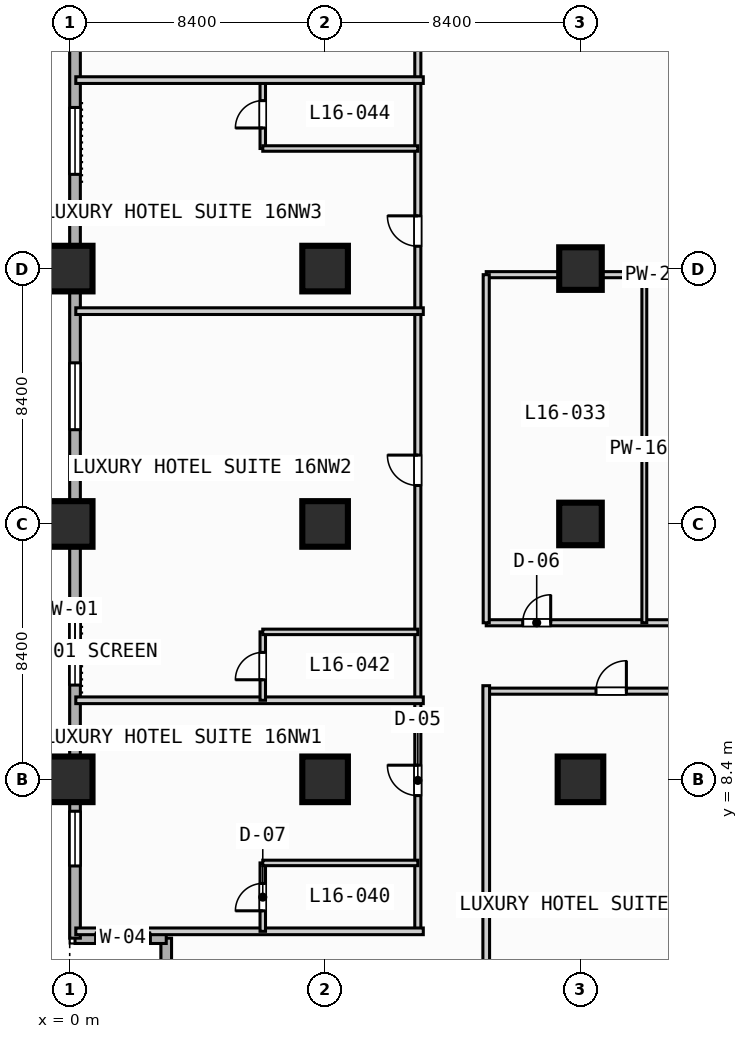
"""IFC4 building model, lengths in metres.
Left out: names, types, materials, properties, quantities, classifications, styles, units other than length and angle.
Written with IfcOpenShell. Run it as: python <this file> out.ifc"""

import sys

from ifc_helpers import new_model, si_unit, direction, frame, frame_2d, origin, origin_2d, place, context, subcontext, project, spatial, rectangle, extrude, element, fill, save


model = new_model("IFC4")
c1 = context("Model", 3, precision=1e-05, world=origin(), true_north=direction((0.0, 1.0)))
c2 = subcontext(c1, "Body", "Model", "MODEL_VIEW")
j1 = project(units=[si_unit("LENGTHUNIT", "METRE"), si_unit("PLANEANGLEUNIT", "RADIAN")], contexts=[c1])
p1 = place(None, origin())
s1 = spatial("IfcSite", under=j1, at=p1, CompositionType="ELEMENT")
p2 = place(p1, origin())
s2 = spatial("IfcBuilding", under=s1, at=p2, CompositionType="ELEMENT")
p3 = place(p2, frame((0.0, 0.0, 70.0)))
s3 = spatial("IfcBuildingStorey", under=s2, at=p3, CompositionType="ELEMENT", Elevation=70.0)
for number, where, z_axis, x_axis in (
    (1, (0.0, 8.4, 0.0), (0.0, 0.0, 1.0), (1.0, 0.0, 0.0)),
    (2, (0.0, 16.8, 0.0), (0.0, 0.0, 1.0), (1.0, 0.0, 0.0)),
    (3, (0.0, 25.2, 0.0), (0.0, 0.0, 1.0), (1.0, 0.0, 0.0)),
    (4, (8.4, 8.4, 0.0), (0.0, 0.0, 1.0), (1.0, 0.0, 0.0)),
    (5, (8.4, 16.8, 0.0), (0.0, 0.0, 1.0), (1.0, 0.0, 0.0)),
    (6, (8.4, 25.2, 0.0), (0.0, 0.0, 1.0), (1.0, 0.0, 0.0)),
    (7, (16.8, 8.4, 0.0), (0.0, 0.0, 1.0), (1.0, 0.0, 0.0)),
):
    element("IfcColumn", number, at=place(p3, frame(where, z_axis=z_axis, x_axis=x_axis)), inside=s3, PredefinedType="COLUMN", context=c2, shape_type="SweptSolid", body=[
        extrude(rectangle(XDim=1.5, YDim=1.5, at=origin_2d()), origin(), (0.0, 0.0, 1.0), 3.8),
    ])
for number, where, z_axis, x_axis in (
    (8, (16.8, 16.8, 0.0), (0.0, 0.0, 1.0), (1.0, 0.0, 0.0)),
    (9, (16.8, 25.2, 0.0), (0.0, 0.0, 1.0), (1.0, 0.0, 0.0)),
):
    element("IfcColumn", number, at=place(p3, frame(where, z_axis=z_axis, x_axis=x_axis)), inside=s3, PredefinedType="COLUMN", context=c2, shape_type="SweptSolid", body=[
        extrude(rectangle(XDim=1.4, YDim=1.4, at=origin_2d()), origin(), (0.0, 0.0, 1.0), 3.8),
    ])
p4 = place(p3, frame((3.175, 0.175, 0.0), z_axis=(0.0, 0.0, 1.0), x_axis=(0.0, 1.0, 0.0)))
e10 = element("IfcWall", 10, at=p4, inside=s3, PredefinedType="STANDARD", context=c2, shape_type="SweptSolid", body=[
    extrude(rectangle(XDim=3.0, YDim=0.35, at=frame_2d((1.5, 0.0))), origin(), (0.0, 0.0, 1.0), 3.55),
])
p5 = place(p3, frame((3.175, 3.175, 0.0), z_axis=(0.0, 0.0, 1.0), x_axis=(-1.0, 0.0, 0.0)))
e11 = element("IfcWall", 11, at=p5, inside=s3, PredefinedType="STANDARD", context=c2, shape_type="SweptSolid", body=[
    extrude(rectangle(XDim=3.0, YDim=0.35, at=frame_2d((1.5, 0.0))), origin(), (0.0, 0.0, 1.0), 3.55),
])
p6 = place(p5, frame((0.522, 0.0, 0.85)))
e12 = element("IfcOpeningElement", 12, at=p6, cuts=e11, PredefinedType="OPENING", context=c2, shape_type="SweptSolid", body=[
    extrude(rectangle(XDim=1.8, YDim=1.8, at=frame_2d((0.9, 0.9))), frame((0.0, 0.185, 0.0), z_axis=(0.0, -1.0, 0.0), x_axis=(1.0, 0.0, 0.0)), (0.0, 0.0, 1.0), 0.37),
])
p7 = place(p3, frame((0.175, 3.175, 0.0), z_axis=(0.0, 0.0, 1.0), x_axis=(0.0, 1.0, 0.0)))
e13 = element("IfcWall", 13, at=p7, inside=s3, PredefinedType="STANDARD", context=c2, shape_type="SweptSolid", body=[
    extrude(rectangle(XDim=86.05, YDim=0.35, at=frame_2d((43.025, 0.0))), origin(), (0.0, 0.0, 1.0), 3.55),
])
p8 = place(p7, frame((42.325, 0.0, 0.0)))
e14 = element("IfcOpeningElement", 14, at=p8, cuts=e13, PredefinedType="OPENING", context=c2, shape_type="SweptSolid", body=[
    extrude(rectangle(XDim=1.4, YDim=2.2, at=frame_2d((0.7, 1.1))), frame((0.0, 0.185, 0.0), z_axis=(0.0, -1.0, 0.0), x_axis=(1.0, 0.0, 0.0)), (0.0, 0.0, 1.0), 0.37),
])
p9 = place(p7, frame((8.325, 0.0, 0.85)))
e15 = element("IfcOpeningElement", 15, at=p9, cuts=e13, PredefinedType="OPENING", context=c2, shape_type="SweptSolid", body=[
    extrude(rectangle(XDim=2.2, YDim=1.8, at=frame_2d((1.1, 0.9))), frame((0.0, 0.185, 0.0), z_axis=(0.0, -1.0, 0.0), x_axis=(1.0, 0.0, 0.0)), (0.0, 0.0, 1.0), 0.37),
])
p10 = place(p7, frame((16.725, 0.0, 0.85)))
e16 = element("IfcOpeningElement", 16, at=p10, cuts=e13, PredefinedType="OPENING", context=c2, shape_type="SweptSolid", body=[
    extrude(rectangle(XDim=2.2, YDim=1.8, at=frame_2d((1.1, 0.9))), frame((0.0, 0.185, 0.0), z_axis=(0.0, -1.0, 0.0), x_axis=(1.0, 0.0, 0.0)), (0.0, 0.0, 1.0), 0.37),
])
p11 = place(p7, frame((25.125, 0.0, 0.85)))
e17 = element("IfcOpeningElement", 17, at=p11, cuts=e13, PredefinedType="OPENING", context=c2, shape_type="SweptSolid", body=[
    extrude(rectangle(XDim=2.2, YDim=1.8, at=frame_2d((1.1, 0.9))), frame((0.0, 0.185, 0.0), z_axis=(0.0, -1.0, 0.0), x_axis=(1.0, 0.0, 0.0)), (0.0, 0.0, 1.0), 0.37),
])
p12 = place(p7, frame((33.525, 0.0, 0.85)))
e18 = element("IfcOpeningElement", 18, at=p12, cuts=e13, PredefinedType="OPENING", context=c2, shape_type="SweptSolid", body=[
    extrude(rectangle(XDim=2.2, YDim=1.8, at=frame_2d((1.1, 0.9))), frame((0.0, 0.185, 0.0), z_axis=(0.0, -1.0, 0.0), x_axis=(1.0, 0.0, 0.0)), (0.0, 0.0, 1.0), 0.37),
])
p13 = place(p7, frame((2.375, 0.0, 0.85)))
e19 = element("IfcOpeningElement", 19, at=p13, cuts=e13, PredefinedType="OPENING", context=c2, shape_type="SweptSolid", body=[
    extrude(rectangle(XDim=1.8, YDim=1.8, at=frame_2d((0.9, 0.9))), frame((0.0, 0.185, 0.0), z_axis=(0.0, -1.0, 0.0), x_axis=(1.0, 0.0, 0.0)), (0.0, 0.0, 1.0), 0.37),
])
p14 = place(p7, frame((56.475, 0.0, 0.85)))
e20 = element("IfcOpeningElement", 20, at=p14, cuts=e13, PredefinedType="OPENING", context=c2, shape_type="SweptSolid", body=[
    extrude(rectangle(XDim=1.8, YDim=1.8, at=frame_2d((0.9, 0.9))), frame((0.0, 0.185, 0.0), z_axis=(0.0, -1.0, 0.0), x_axis=(1.0, 0.0, 0.0)), (0.0, 0.0, 1.0), 0.37),
])
p15 = place(p3, frame((13.7, 13.55, 0.0), z_axis=(0.0, 0.0, 1.0), x_axis=(1.0, 0.0, 0.0)))
e21 = element("IfcWall", 21, at=p15, inside=s3, PredefinedType="PARTITIONING", context=c2, shape_type="SweptSolid", body=[
    extrude(rectangle(XDim=9.9, YDim=0.2, at=frame_2d((4.95, 0.0))), origin(), (0.0, 0.0, 1.0), 3.55),
])
p16 = place(p15, frame((1.2, 0.0, 0.0)))
e22 = element("IfcOpeningElement", 22, at=p16, cuts=e21, PredefinedType="OPENING", context=c2, shape_type="SweptSolid", body=[
    extrude(rectangle(XDim=0.92, YDim=2.1, at=frame_2d((0.46, 1.05))), frame((0.0, 0.11, 0.0), z_axis=(0.0, -1.0, 0.0), x_axis=(1.0, 0.0, 0.0)), (0.0, 0.0, 1.0), 0.22),
])
p17 = place(p15, frame((6.4, 0.0, 0.0)))
e23 = element("IfcOpeningElement", 23, at=p17, cuts=e21, PredefinedType="OPENING", context=c2, shape_type="SweptSolid", body=[
    extrude(rectangle(XDim=0.92, YDim=2.1, at=frame_2d((0.46, 1.05))), frame((0.0, 0.11, 0.0), z_axis=(0.0, -1.0, 0.0), x_axis=(1.0, 0.0, 0.0)), (0.0, 0.0, 1.0), 0.22),
])
p18 = place(p3, frame((18.9, 13.55, 0.0), z_axis=(0.0, 0.0, 1.0), x_axis=(0.0, 1.0, 0.0)))
e24 = element("IfcWall", 24, at=p18, inside=s3, PredefinedType="PARTITIONING", context=c2, shape_type="SweptSolid", body=[
    extrude(rectangle(XDim=11.45, YDim=0.16, at=frame_2d((5.725, 0.0))), origin(), (0.0, 0.0, 1.0), 3.55),
])
p19 = place(p3, frame((13.7, 25.0, 0.0), z_axis=(0.0, 0.0, 1.0), x_axis=(1.0, 0.0, 0.0)))
e25 = element("IfcWall", 25, at=p19, inside=s3, PredefinedType="PARTITIONING", context=c2, shape_type="SweptSolid", body=[
    extrude(rectangle(XDim=9.9, YDim=0.2, at=frame_2d((4.95, 0.0))), origin(), (0.0, 0.0, 1.0), 2.8),
])
p20 = place(p3, frame((13.7, 13.55, 0.0), z_axis=(0.0, 0.0, 1.0), x_axis=(0.0, 1.0, 0.0)))
e26 = element("IfcWall", 26, at=p20, inside=s3, PredefinedType="PARTITIONING", context=c2, shape_type="SweptSolid", body=[
    extrude(rectangle(XDim=11.45, YDim=0.2, at=frame_2d((5.725, 0.0))), origin(), (0.0, 0.0, 1.0), 3.55),
])
p21 = place(p3, frame((11.45, 3.4, 0.0), z_axis=(0.0, 0.0, 1.0), x_axis=(0.0, 1.0, 0.0)))
e27 = element("IfcWall", 27, at=p21, inside=s3, PredefinedType="PARTITIONING", context=c2, shape_type="SweptSolid", body=[
    extrude(rectangle(XDim=60.4, YDim=0.2, at=frame_2d((30.2, 0.0))), origin(), (0.0, 0.0, 1.0), 3.55),
])
p22 = place(p21, frame((4.465, 0.0, 0.0)))
e28 = element("IfcOpeningElement", 28, at=p22, cuts=e27, PredefinedType="OPENING", context=c2, shape_type="SweptSolid", body=[
    extrude(rectangle(XDim=1.0, YDim=2.15, at=frame_2d((0.5, 1.075))), frame((0.0, 0.11, 0.0), z_axis=(0.0, -1.0, 0.0), x_axis=(1.0, 0.0, 0.0)), (0.0, 0.0, 1.0), 0.22),
])
p23 = place(p21, frame((14.665, 0.0, 0.0)))
e29 = element("IfcOpeningElement", 29, at=p23, cuts=e27, PredefinedType="OPENING", context=c2, shape_type="SweptSolid", body=[
    extrude(rectangle(XDim=1.0, YDim=2.15, at=frame_2d((0.5, 1.075))), frame((0.0, 0.11, 0.0), z_axis=(0.0, -1.0, 0.0), x_axis=(1.0, 0.0, 0.0)), (0.0, 0.0, 1.0), 0.22),
])
p24 = place(p21, frame((22.535, 0.0, 0.0)))
e30 = element("IfcOpeningElement", 30, at=p24, cuts=e27, PredefinedType="OPENING", context=c2, shape_type="SweptSolid", body=[
    extrude(rectangle(XDim=1.0, YDim=2.15, at=frame_2d((0.5, 1.075))), frame((0.0, 0.11, 0.0), z_axis=(0.0, -1.0, 0.0), x_axis=(1.0, 0.0, 0.0)), (0.0, 0.0, 1.0), 0.22),
])
p25 = place(p21, frame((31.16, 0.0, 0.0)))
e31 = element("IfcOpeningElement", 31, at=p25, cuts=e27, PredefinedType="OPENING", context=c2, shape_type="SweptSolid", body=[
    extrude(rectangle(XDim=1.0, YDim=2.15, at=frame_2d((0.5, 1.075))), frame((0.0, 0.11, 0.0), z_axis=(0.0, -1.0, 0.0), x_axis=(1.0, 0.0, 0.0)), (0.0, 0.0, 1.0), 0.22),
])
p26 = place(p21, frame((42.36, 0.0, 0.0)))
e32 = element("IfcOpeningElement", 32, at=p26, cuts=e27, PredefinedType="OPENING", context=c2, shape_type="SweptSolid", body=[
    extrude(rectangle(XDim=1.0, YDim=2.15, at=frame_2d((0.5, 1.075))), frame((0.0, 0.11, 0.0), z_axis=(0.0, -1.0, 0.0), x_axis=(1.0, 0.0, 0.0)), (0.0, 0.0, 1.0), 0.22),
])
p27 = place(p21, frame((56.065, 0.0, 0.0)))
e33 = element("IfcOpeningElement", 33, at=p27, cuts=e27, PredefinedType="OPENING", context=c2, shape_type="SweptSolid", body=[
    extrude(rectangle(XDim=1.0, YDim=2.15, at=frame_2d((0.5, 1.075))), frame((0.0, 0.11, 0.0), z_axis=(0.0, -1.0, 0.0), x_axis=(1.0, 0.0, 0.0)), (0.0, 0.0, 1.0), 0.22),
])
p28 = place(p3, frame((0.2, 3.4, 0.0), z_axis=(0.0, 0.0, 1.0), x_axis=(1.0, 0.0, 0.0)))
e34 = element("IfcWall", 34, at=p28, inside=s3, PredefinedType="PARTITIONING", context=c2, shape_type="SweptSolid", body=[
    extrude(rectangle(XDim=11.43, YDim=0.22, at=frame_2d((5.715, 0.0))), origin(), (0.0, 0.0, 1.0), 3.55),
])
p29 = place(p3, frame((6.35, 3.4, 0.0), z_axis=(0.0, 0.0, 1.0), x_axis=(0.0, 1.0, 0.0)))
e35 = element("IfcWall", 35, at=p29, inside=s3, PredefinedType="PLUMBINGWALL", context=c2, shape_type="SweptSolid", body=[
    extrude(rectangle(XDim=2.25, YDim=0.18, at=frame_2d((1.125, 0.0))), origin(), (0.0, 0.0, 1.0), 3.55),
])
p30 = place(p29, frame((0.675, 0.0, 0.0)))
e36 = element("IfcOpeningElement", 36, at=p30, cuts=e35, PredefinedType="OPENING", context=c2, shape_type="SweptSolid", body=[
    extrude(rectangle(XDim=0.9, YDim=2.1, at=frame_2d((0.45, 1.05))), frame((0.0, 0.1, 0.0), z_axis=(0.0, -1.0, 0.0), x_axis=(1.0, 0.0, 0.0)), (0.0, 0.0, 1.0), 0.2),
])
p31 = place(p3, frame((6.35, 5.65, 0.0), z_axis=(0.0, 0.0, 1.0), x_axis=(1.0, 0.0, 0.0)))
e37 = element("IfcWall", 37, at=p31, inside=s3, PredefinedType="PLUMBINGWALL", context=c2, shape_type="SweptSolid", body=[
    extrude(rectangle(XDim=5.1, YDim=0.18, at=frame_2d((2.55, 0.0))), origin(), (0.0, 0.0, 1.0), 3.55),
])
p32 = place(p3, frame((0.2, 11.0, 0.0), z_axis=(0.0, 0.0, 1.0), x_axis=(1.0, 0.0, 0.0)))
e38 = element("IfcWall", 38, at=p32, inside=s3, PredefinedType="PARTITIONING", context=c2, shape_type="SweptSolid", body=[
    extrude(rectangle(XDim=11.43, YDim=0.22, at=frame_2d((5.715, 0.0))), origin(), (0.0, 0.0, 1.0), 3.55),
])
p33 = place(p3, frame((6.35, 11.0, 0.0), z_axis=(0.0, 0.0, 1.0), x_axis=(0.0, 1.0, 0.0)))
e39 = element("IfcWall", 39, at=p33, inside=s3, PredefinedType="PLUMBINGWALL", context=c2, shape_type="SweptSolid", body=[
    extrude(rectangle(XDim=2.25, YDim=0.18, at=frame_2d((1.125, 0.0))), origin(), (0.0, 0.0, 1.0), 3.55),
])
p34 = place(p33, frame((0.675, 0.0, 0.0)))
e40 = element("IfcOpeningElement", 40, at=p34, cuts=e39, PredefinedType="OPENING", context=c2, shape_type="SweptSolid", body=[
    extrude(rectangle(XDim=0.9, YDim=2.1, at=frame_2d((0.45, 1.05))), frame((0.0, 0.1, 0.0), z_axis=(0.0, -1.0, 0.0), x_axis=(1.0, 0.0, 0.0)), (0.0, 0.0, 1.0), 0.2),
])
p35 = place(p3, frame((6.35, 13.25, 0.0), z_axis=(0.0, 0.0, 1.0), x_axis=(1.0, 0.0, 0.0)))
e41 = element("IfcWall", 41, at=p35, inside=s3, PredefinedType="PLUMBINGWALL", context=c2, shape_type="SweptSolid", body=[
    extrude(rectangle(XDim=5.1, YDim=0.18, at=frame_2d((2.55, 0.0))), origin(), (0.0, 0.0, 1.0), 3.55),
])
p36 = place(p3, frame((0.2, 23.8, 0.0), z_axis=(0.0, 0.0, 1.0), x_axis=(1.0, 0.0, 0.0)))
e42 = element("IfcWall", 42, at=p36, inside=s3, PredefinedType="PARTITIONING", context=c2, shape_type="SweptSolid", body=[
    extrude(rectangle(XDim=11.43, YDim=0.22, at=frame_2d((5.715, 0.0))), origin(), (0.0, 0.0, 1.0), 3.55),
])
p37 = place(p3, frame((6.35, 29.15, 0.0), z_axis=(0.0, 0.0, 1.0), x_axis=(0.0, 1.0, 0.0)))
e43 = element("IfcWall", 43, at=p37, inside=s3, PredefinedType="PLUMBINGWALL", context=c2, shape_type="SweptSolid", body=[
    extrude(rectangle(XDim=2.25, YDim=0.18, at=frame_2d((1.125, 0.0))), origin(), (0.0, 0.0, 1.0), 3.55),
])
p38 = place(p37, frame((0.675, 0.0, 0.0)))
e44 = element("IfcOpeningElement", 44, at=p38, cuts=e43, PredefinedType="OPENING", context=c2, shape_type="SweptSolid", body=[
    extrude(rectangle(XDim=0.9, YDim=2.1, at=frame_2d((0.45, 1.05))), frame((0.0, 0.1, 0.0), z_axis=(0.0, -1.0, 0.0), x_axis=(1.0, 0.0, 0.0)), (0.0, 0.0, 1.0), 0.2),
])
p39 = place(p3, frame((6.35, 29.15, 0.0), z_axis=(0.0, 0.0, 1.0), x_axis=(1.0, 0.0, 0.0)))
e45 = element("IfcWall", 45, at=p39, inside=s3, PredefinedType="PLUMBINGWALL", context=c2, shape_type="SweptSolid", body=[
    extrude(rectangle(XDim=5.1, YDim=0.18, at=frame_2d((2.55, 0.0))), origin(), (0.0, 0.0, 1.0), 3.55),
])
p40 = place(p3, frame((0.2, 31.4, 0.0), z_axis=(0.0, 0.0, 1.0), x_axis=(1.0, 0.0, 0.0)))
e46 = element("IfcWall", 46, at=p40, inside=s3, PredefinedType="PARTITIONING", context=c2, shape_type="SweptSolid", body=[
    extrude(rectangle(XDim=11.43, YDim=0.22, at=frame_2d((5.715, 0.0))), origin(), (0.0, 0.0, 1.0), 3.55),
])
p41 = place(p3, frame((13.7, 11.3, 0.0), z_axis=(0.0, 0.0, 1.0), x_axis=(1.0, 0.0, 0.0)))
e47 = element("IfcWall", 47, at=p41, inside=s3, PredefinedType="PARTITIONING", context=c2, shape_type="SweptSolid", body=[
    extrude(rectangle(XDim=50.1, YDim=0.2, at=frame_2d((25.05, 0.0))), origin(), (0.0, 0.0, 1.0), 3.55),
])
p42 = place(p41, frame((3.61, 0.0, 0.0)))
e48 = element("IfcOpeningElement", 48, at=p42, cuts=e47, PredefinedType="OPENING", context=c2, shape_type="SweptSolid", body=[
    extrude(rectangle(XDim=1.0, YDim=2.15, at=frame_2d((0.5, 1.075))), frame((0.0, 0.11, 0.0), z_axis=(0.0, -1.0, 0.0), x_axis=(1.0, 0.0, 0.0)), (0.0, 0.0, 1.0), 0.22),
])
p43 = place(p41, frame((16.81, 0.0, 0.0)))
e49 = element("IfcOpeningElement", 49, at=p43, cuts=e47, PredefinedType="OPENING", context=c2, shape_type="SweptSolid", body=[
    extrude(rectangle(XDim=1.0, YDim=2.15, at=frame_2d((0.5, 1.075))), frame((0.0, 0.11, 0.0), z_axis=(0.0, -1.0, 0.0), x_axis=(1.0, 0.0, 0.0)), (0.0, 0.0, 1.0), 0.22),
])
p44 = place(p41, frame((31.935, 0.0, 0.0)))
e50 = element("IfcOpeningElement", 50, at=p44, cuts=e47, PredefinedType="OPENING", context=c2, shape_type="SweptSolid", body=[
    extrude(rectangle(XDim=1.0, YDim=2.15, at=frame_2d((0.5, 1.075))), frame((0.0, 0.11, 0.0), z_axis=(0.0, -1.0, 0.0), x_axis=(1.0, 0.0, 0.0)), (0.0, 0.0, 1.0), 0.22),
])
p45 = place(p41, frame((43.785, 0.0, 0.0)))
e51 = element("IfcOpeningElement", 51, at=p45, cuts=e47, PredefinedType="OPENING", context=c2, shape_type="SweptSolid", body=[
    extrude(rectangle(XDim=1.0, YDim=2.15, at=frame_2d((0.5, 1.075))), frame((0.0, 0.11, 0.0), z_axis=(0.0, -1.0, 0.0), x_axis=(1.0, 0.0, 0.0)), (0.0, 0.0, 1.0), 0.22),
])
p46 = place(p3, frame((13.7, 0.2, 0.0), z_axis=(0.0, 0.0, 1.0), x_axis=(0.0, 1.0, 0.0)))
e52 = element("IfcWall", 52, at=p46, inside=s3, PredefinedType="PARTITIONING", context=c2, shape_type="SweptSolid", body=[
    extrude(rectangle(XDim=11.28, YDim=0.22, at=frame_2d((5.64, 0.0))), origin(), (0.0, 0.0, 1.0), 3.55),
])
p47 = place(p6, origin())
e53 = element("IfcWindow", 53, at=p47, inside=s3, PartitioningType="SINGLE_PANEL", PredefinedType="WINDOW", context=c2, shape_type="SweptSolid", body=[
    extrude(rectangle(XDim=1.8, YDim=1.8, at=frame_2d((0.9, 0.9))), frame((0.0, 0.03, 0.0), z_axis=(0.0, -1.0, 0.0), x_axis=(1.0, 0.0, 0.0)), (0.0, 0.0, 1.0), 0.06),
])
fill(e12, e53)
p48 = place(p9, origin())
e54 = element("IfcWindow", 54, at=p48, inside=s3, PartitioningType="SINGLE_PANEL", PredefinedType="WINDOW", context=c2, shape_type="SweptSolid", body=[
    extrude(rectangle(XDim=2.2, YDim=1.8, at=frame_2d((1.1, 0.9))), frame((0.0, 0.03, 0.0), z_axis=(0.0, -1.0, 0.0), x_axis=(1.0, 0.0, 0.0)), (0.0, 0.0, 1.0), 0.06),
])
fill(e15, e54)
p49 = place(p10, origin())
e55 = element("IfcWindow", 55, at=p49, inside=s3, PartitioningType="SINGLE_PANEL", PredefinedType="WINDOW", context=c2, shape_type="SweptSolid", body=[
    extrude(rectangle(XDim=2.2, YDim=1.8, at=frame_2d((1.1, 0.9))), frame((0.0, 0.03, 0.0), z_axis=(0.0, -1.0, 0.0), x_axis=(1.0, 0.0, 0.0)), (0.0, 0.0, 1.0), 0.06),
])
fill(e16, e55)
p50 = place(p11, origin())
e56 = element("IfcWindow", 56, at=p50, inside=s3, PartitioningType="SINGLE_PANEL", PredefinedType="WINDOW", context=c2, shape_type="SweptSolid", body=[
    extrude(rectangle(XDim=2.2, YDim=1.8, at=frame_2d((1.1, 0.9))), frame((0.0, 0.03, 0.0), z_axis=(0.0, -1.0, 0.0), x_axis=(1.0, 0.0, 0.0)), (0.0, 0.0, 1.0), 0.06),
])
fill(e17, e56)
p51 = place(p13, origin())
e57 = element("IfcWindow", 57, at=p51, inside=s3, PartitioningType="SINGLE_PANEL", PredefinedType="WINDOW", context=c2, shape_type="SweptSolid", body=[
    extrude(rectangle(XDim=1.8, YDim=1.8, at=frame_2d((0.9, 0.9))), frame((0.0, 0.03, 0.0), z_axis=(0.0, -1.0, 0.0), x_axis=(1.0, 0.0, 0.0)), (0.0, 0.0, 1.0), 0.06),
])
fill(e19, e57)
p52 = place(p16, origin())
e58 = element("IfcDoor", 58, at=p52, inside=s3, OperationType="SINGLE_SWING_RIGHT", PredefinedType="DOOR", context=c2, shape_type="SweptSolid", body=[
    extrude(rectangle(XDim=0.92, YDim=2.1, at=frame_2d((0.46, 1.05))), frame((0.0, 0.025, 0.0), z_axis=(0.0, -1.0, 0.0), x_axis=(1.0, 0.0, 0.0)), (0.0, 0.0, 1.0), 0.05),
])
fill(e22, e58)
p53 = place(p22, origin())
e59 = element("IfcDoor", 59, at=p53, inside=s3, OperationType="SINGLE_SWING_RIGHT", PredefinedType="DOOR", context=c2, shape_type="SweptSolid", body=[
    extrude(rectangle(XDim=1.0, YDim=2.15, at=frame_2d((0.5, 1.075))), frame((0.0, 0.025, 0.0), z_axis=(0.0, -1.0, 0.0), x_axis=(1.0, 0.0, 0.0)), (0.0, 0.0, 1.0), 0.05),
])
fill(e28, e59)
p54 = place(p23, origin())
e60 = element("IfcDoor", 60, at=p54, inside=s3, OperationType="SINGLE_SWING_RIGHT", PredefinedType="DOOR", context=c2, shape_type="SweptSolid", body=[
    extrude(rectangle(XDim=1.0, YDim=2.15, at=frame_2d((0.5, 1.075))), frame((0.0, 0.025, 0.0), z_axis=(0.0, -1.0, 0.0), x_axis=(1.0, 0.0, 0.0)), (0.0, 0.0, 1.0), 0.05),
])
fill(e29, e60)
p55 = place(p24, origin())
e61 = element("IfcDoor", 61, at=p55, inside=s3, OperationType="SINGLE_SWING_RIGHT", PredefinedType="DOOR", context=c2, shape_type="SweptSolid", body=[
    extrude(rectangle(XDim=1.0, YDim=2.15, at=frame_2d((0.5, 1.075))), frame((0.0, 0.025, 0.0), z_axis=(0.0, -1.0, 0.0), x_axis=(1.0, 0.0, 0.0)), (0.0, 0.0, 1.0), 0.05),
])
fill(e30, e61)
p56 = place(p30, origin())
e62 = element("IfcDoor", 62, at=p56, inside=s3, OperationType="SINGLE_SWING_LEFT", PredefinedType="DOOR", context=c2, shape_type="SweptSolid", body=[
    extrude(rectangle(XDim=0.9, YDim=2.1, at=frame_2d((0.45, 1.05))), frame((0.0, 0.025, 0.0), z_axis=(0.0, -1.0, 0.0), x_axis=(1.0, 0.0, 0.0)), (0.0, 0.0, 1.0), 0.05),
])
fill(e36, e62)
p57 = place(p34, origin())
e63 = element("IfcDoor", 63, at=p57, inside=s3, OperationType="SINGLE_SWING_LEFT", PredefinedType="DOOR", context=c2, shape_type="SweptSolid", body=[
    extrude(rectangle(XDim=0.9, YDim=2.1, at=frame_2d((0.45, 1.05))), frame((0.0, 0.025, 0.0), z_axis=(0.0, -1.0, 0.0), x_axis=(1.0, 0.0, 0.0)), (0.0, 0.0, 1.0), 0.05),
])
fill(e40, e63)
p58 = place(p38, origin())
e64 = element("IfcDoor", 64, at=p58, inside=s3, OperationType="SINGLE_SWING_LEFT", PredefinedType="DOOR", context=c2, shape_type="SweptSolid", body=[
    extrude(rectangle(XDim=0.9, YDim=2.1, at=frame_2d((0.45, 1.05))), frame((0.0, 0.025, 0.0), z_axis=(0.0, -1.0, 0.0), x_axis=(1.0, 0.0, 0.0)), (0.0, 0.0, 1.0), 0.05),
])
fill(e44, e64)
p59 = place(p42, origin())
e65 = element("IfcDoor", 65, at=p59, inside=s3, OperationType="SINGLE_SWING_RIGHT", PredefinedType="DOOR", context=c2, shape_type="SweptSolid", body=[
    extrude(rectangle(XDim=1.0, YDim=2.15, at=frame_2d((0.5, 1.075))), frame((0.0, 0.025, 0.0), z_axis=(0.0, -1.0, 0.0), x_axis=(1.0, 0.0, 0.0)), (0.0, 0.0, 1.0), 0.05),
])
fill(e48, e65)
save(model, sys.argv[1])
